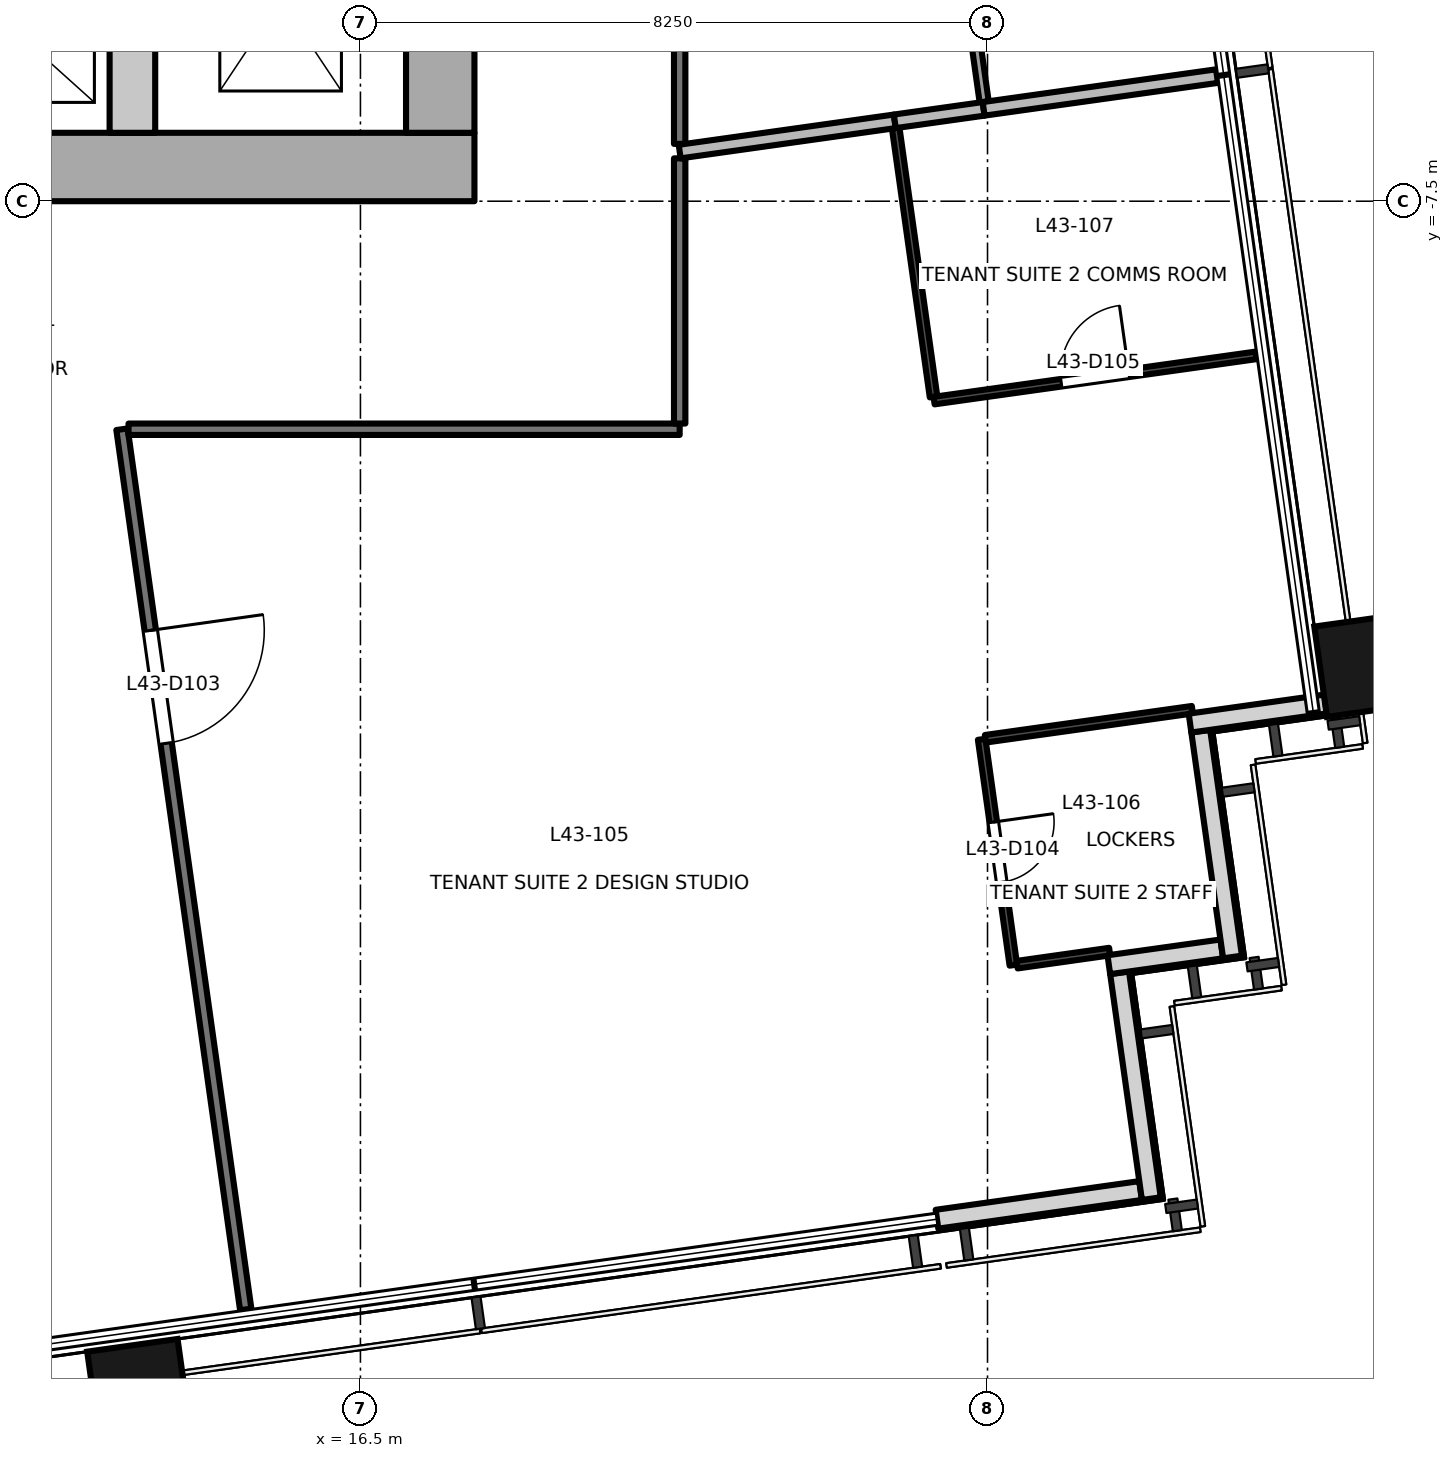
"""IFC4 building model, lengths in metres.
Left out: names, types, materials, properties, quantities, classifications, styles, units other than length and angle.
Written with IfcOpenShell. Run it as: python <this file> out.ifc"""

import sys

from ifc_helpers import new_model, si_unit, direction, frame, frame_2d, origin, origin_2d, place, context, subcontext, project, spatial, rectangle, extrude, element, fill, save


model = new_model("IFC4")
c1 = context("Model", 3, precision=1e-05, world=origin(), true_north=direction((0.0, 1.0)))
c2 = subcontext(c1, "Body", "Model", "MODEL_VIEW")
j1 = project(units=[si_unit("LENGTHUNIT", "METRE"), si_unit("PLANEANGLEUNIT", "RADIAN")], contexts=[c1])
p1 = place(None, origin())
s1 = spatial("IfcSite", under=j1, at=p1, CompositionType="ELEMENT")
p2 = place(p1, origin())
s2 = spatial("IfcBuilding", under=s1, at=p2, CompositionType="ELEMENT")
p3 = place(p2, frame((0.0, 0.0, 188.0)))
s3 = spatial("IfcBuildingStorey", under=s2, at=p3, CompositionType="ELEMENT", Elevation=188.0)
for number, where, z_axis, x_axis in (
    (1, (13.625, -23.443, -0.2), (0.0, 0.0, 1.0), (0.99, 0.139, 0.0)),
    (2, (30.024, -13.565, -0.2), (0.0, 0.0, 1.0), (-0.139, 0.99, 0.0)),
):
    element("IfcColumn", number, at=place(p3, frame(where, z_axis=z_axis, x_axis=x_axis)), inside=s3, PredefinedType="COLUMN", context=c2, shape_type="SweptSolid", body=[
        extrude(rectangle(XDim=1.2, YDim=1.8, at=origin_2d()), origin(), (0.0, 0.0, 1.0), 3.9),
    ])
p4 = place(p3, frame((24.085, -20.893, 0.0), z_axis=(0.0, 0.0, 1.0), x_axis=(0.990255800966, 0.139260362823, 0.0)))
e3 = element("IfcWall", 3, at=p4, inside=s3, PredefinedType="SOLIDWALL", context=c2, shape_type="SweptSolid", body=[
    extrude(rectangle(XDim=2.705, YDim=0.25, at=frame_2d((1.353, 0.0))), origin(), (0.0, 0.0, 1.0), 3.7),
])
p5 = place(p3, frame((26.905, -20.622, 0.0), z_axis=(0.0, 0.0, 1.0), x_axis=(-0.139313431826, 0.990248336385, 0.0)))
e4 = element("IfcWall", 4, at=p5, inside=s3, PredefinedType="SOLIDWALL", context=c2, shape_type="SweptSolid", body=[
    extrude(rectangle(XDim=3.0, YDim=0.25, at=frame_2d((1.5, 0.0))), origin(), (0.0, 0.0, 1.0), 3.7),
])
p6 = place(p3, frame((26.346, -17.544, 0.0), z_axis=(0.0, 0.0, 1.0), x_axis=(0.990368090482, 0.13845954411, 0.0)))
e5 = element("IfcWall", 5, at=p6, inside=s3, PredefinedType="SOLIDWALL", context=c2, shape_type="SweptSolid", body=[
    extrude(rectangle(XDim=1.5, YDim=0.25, at=frame_2d((0.75, 0.0))), origin(), (0.0, 0.0, 1.0), 3.7),
])
p7 = place(p3, frame((27.973, -17.443, 0.0), z_axis=(0.0, 0.0, 1.0), x_axis=(-0.139313431826, 0.990248336385, 0.0)))
e6 = element("IfcWall", 6, at=p7, inside=s3, PredefinedType="SOLIDWALL", context=c2, shape_type="SweptSolid", body=[
    extrude(rectangle(XDim=3.0, YDim=0.25, at=frame_2d((1.5, 0.0))), origin(), (0.0, 0.0, 1.0), 3.7),
])
p8 = place(p3, frame((27.414, -14.366, 0.0), z_axis=(0.0, 0.0, 1.0), x_axis=(0.990256286673, 0.139256908998, 0.0)))
e7 = element("IfcWall", 7, at=p8, inside=s3, PredefinedType="SOLIDWALL", context=c2, shape_type="SweptSolid", body=[
    extrude(rectangle(XDim=1.801, YDim=0.25, at=frame_2d((0.9, 0.0))), origin(), (0.0, 0.0, 1.0), 3.7),
])
p9 = place(p3, frame((-18.0, -7.05, -0.2), z_axis=(0.0, 0.0, 1.0), x_axis=(1.0, 0.0, 0.0)))
e8 = element("IfcWall", 8, at=p9, inside=s3, PredefinedType="SHEAR", context=c2, shape_type="SweptSolid", body=[
    extrude(rectangle(XDim=36.0, YDim=0.9, at=frame_2d((18.0, 0.0))), origin(), (0.0, 0.0, 1.0), 3.9),
])
p10 = place(p9, frame((11.3, 0.0, 0.2)))
e9 = element("IfcOpeningElement", 9, at=p10, cuts=e8, PredefinedType="OPENING", context=c2, shape_type="SweptSolid", body=[
    extrude(rectangle(XDim=1.8, YDim=2.1, at=frame_2d((0.9, 1.05))), frame((0.0, 0.46, 0.0), z_axis=(0.0, -1.0, 0.0), x_axis=(1.0, 0.0, 0.0)), (0.0, 0.0, 1.0), 0.921),
])
p11 = place(p9, frame((16.8, 0.0, 0.2)))
e10 = element("IfcOpeningElement", 10, at=p11, cuts=e8, PredefinedType="OPENING", context=c2, shape_type="SweptSolid", body=[
    extrude(rectangle(XDim=2.4, YDim=2.1, at=frame_2d((1.2, 1.05))), frame((0.0, 0.46, 0.0), z_axis=(0.0, -1.0, 0.0), x_axis=(1.0, 0.0, 0.0)), (0.0, 0.0, 1.0), 0.921),
])
p12 = place(p9, frame((26.1, 0.0, 0.2)))
e11 = element("IfcOpeningElement", 11, at=p12, cuts=e8, PredefinedType="OPENING", context=c2, shape_type="SweptSolid", body=[
    extrude(rectangle(XDim=2.4, YDim=2.1, at=frame_2d((1.2, 1.05))), frame((0.0, 0.46, 0.0), z_axis=(0.0, -1.0, 0.0), x_axis=(1.0, 0.0, 0.0)), (0.0, 0.0, 1.0), 0.921),
])
p13 = place(p3, frame((17.55, -6.6, -0.2), z_axis=(0.0, 0.0, 1.0), x_axis=(0.0, 1.0, 0.0)))
e12 = element("IfcWall", 12, at=p13, inside=s3, PredefinedType="SHEAR", context=c2, shape_type="SweptSolid", body=[
    extrude(rectangle(XDim=13.2, YDim=0.9, at=frame_2d((6.6, 0.0))), origin(), (0.0, 0.0, 1.0), 3.9),
])
p14 = place(p13, frame((4.55, 0.0, 0.2)))
e13 = element("IfcOpeningElement", 13, at=p14, cuts=e12, PredefinedType="OPENING", context=c2, shape_type="SweptSolid", body=[
    extrude(rectangle(XDim=1.2, YDim=2.1, at=frame_2d((0.6, 1.05))), frame((0.0, 0.46, 0.0), z_axis=(0.0, -1.0, 0.0), x_axis=(1.0, 0.0, 0.0)), (0.0, 0.0, 1.0), 0.921),
])
p15 = place(p3, frame((13.5, -6.6, -0.2), z_axis=(0.0, 0.0, 1.0), x_axis=(0.0, 1.0, 0.0)))
e14 = element("IfcWall", 14, at=p15, inside=s3, PredefinedType="SHEAR", context=c2, shape_type="SweptSolid", body=[
    extrude(rectangle(XDim=13.2, YDim=0.6, at=frame_2d((6.6, 0.0))), origin(), (0.0, 0.0, 1.0), 3.9),
])
p16 = place(p3, frame((13.363, -10.5, 0.0), z_axis=(0.0, 0.0, 1.0), x_axis=(0.139211326844, -0.990262695692, 0.0)))
e15 = element("IfcWall", 15, at=p16, inside=s3, PredefinedType="PARTITIONING", context=c2, shape_type="SweptSolid", body=[
    extrude(rectangle(XDim=11.694, YDim=0.15, at=frame_2d((5.847, 0.0))), origin(), (0.0, 0.0, 1.0), 3.1),
])
p17 = place(p16, frame((2.673, 0.0, 0.0)))
e16 = element("IfcOpeningElement", 16, at=p17, cuts=e15, PredefinedType="OPENING", context=c2, shape_type="SweptSolid", body=[
    extrude(rectangle(XDim=1.5, YDim=2.1, at=frame_2d((0.75, 1.05))), frame((0.0, 0.085, 0.0), z_axis=(0.0, -1.0, 0.0), x_axis=(1.0, 0.0, 0.0)), (0.0, 0.0, 1.0), 0.171),
])
p18 = place(p3, frame((20.7, -10.5, 0.0), z_axis=(0.0, 0.0, 1.0), x_axis=(-1.0, 0.0, 0.0)))
e17 = element("IfcWall", 17, at=p18, inside=s3, PredefinedType="PARTITIONING", context=c2, shape_type="SweptSolid", body=[
    extrude(rectangle(XDim=7.251, YDim=0.15, at=frame_2d((3.625, 0.0))), origin(), (0.0, 0.0, 1.0), 3.1),
])
p19 = place(p3, frame((20.7, -6.936, 0.0), z_axis=(0.0, 0.0, 1.0), x_axis=(0.0, -1.0, 0.0)))
e18 = element("IfcWall", 18, at=p19, inside=s3, PredefinedType="PARTITIONING", context=c2, shape_type="SweptSolid", body=[
    extrude(rectangle(XDim=3.489, YDim=0.15, at=frame_2d((1.745, 0.0))), origin(), (0.0, 0.0, 1.0), 3.7),
])
p20 = place(p3, frame((20.7, 4.576, 0.0), z_axis=(0.0, 0.0, 1.0), x_axis=(0.0, -1.0, 0.0)))
e19 = element("IfcWall", 19, at=p20, inside=s3, PredefinedType="PARTITIONING", context=c2, shape_type="SweptSolid", body=[
    extrude(rectangle(XDim=11.322, YDim=0.15, at=frame_2d((5.661, 0.0))), origin(), (0.0, 0.0, 1.0), 3.25),
])
p21 = place(p20, frame((7.691, 0.0, 0.0)))
e20 = element("IfcOpeningElement", 20, at=p21, cuts=e19, PredefinedType="OPENING", context=c2, shape_type="SweptSolid", body=[
    extrude(rectangle(XDim=0.9, YDim=2.1, at=frame_2d((0.45, 1.05))), frame((0.0, 0.085, 0.0), z_axis=(0.0, -1.0, 0.0), x_axis=(1.0, 0.0, 0.0)), (0.0, 0.0, 1.0), 0.171),
])
p22 = place(p3, frame((24.673, -14.579, 0.0), z_axis=(0.0, 0.0, 1.0), x_axis=(0.138994228812, -0.990293191109, 0.0)))
e21 = element("IfcWall", 21, at=p22, inside=s3, PredefinedType="PARTITIONING", context=c2, shape_type="SweptSolid", body=[
    extrude(rectangle(XDim=3.0, YDim=0.1, at=frame_2d((1.5, 0.0))), origin(), (0.0, 0.0, 1.0), 3.7),
])
p23 = place(p22, frame((1.1, 0.0, 0.0)))
e22 = element("IfcOpeningElement", 22, at=p23, cuts=e21, PredefinedType="OPENING", context=c2, shape_type="SweptSolid", body=[
    extrude(rectangle(XDim=0.8, YDim=2.1, at=frame_2d((0.4, 1.05))), frame((0.0, 0.061, 0.0), z_axis=(0.0, -1.0, 0.0), x_axis=(1.0, 0.0, 0.0)), (0.0, 0.0, 1.0), 0.121),
])
p24 = place(p3, frame((25.14, -17.544, 0.0), z_axis=(0.0, 0.0, 1.0), x_axis=(0.990174663817, 0.139836100968, 0.0)))
e23 = element("IfcWall", 23, at=p24, inside=s3, PredefinedType="PARTITIONING", context=c2, shape_type="SweptSolid", body=[
    extrude(rectangle(XDim=1.229, YDim=0.1, at=frame_2d((0.615, 0.0))), origin(), (0.0, 0.0, 1.0), 3.7),
])
p25 = place(p3, frame((27.445, -14.19, 0.0), z_axis=(0.0, 0.0, 1.0), x_axis=(-0.990299764824, -0.138947384969, 0.0)))
e24 = element("IfcWall", 24, at=p25, inside=s3, PredefinedType="PARTITIONING", context=c2, shape_type="SweptSolid", body=[
    extrude(rectangle(XDim=2.75, YDim=0.1, at=frame_2d((1.375, 0.0))), origin(), (0.0, 0.0, 1.0), 3.7),
])
p26 = place(p3, frame((23.542, -6.538, 0.0), z_axis=(0.0, 0.0, 1.0), x_axis=(0.139477964322, -0.990225175134, 0.0)))
e25 = element("IfcWall", 25, at=p26, inside=s3, PredefinedType="PARTITIONING", context=c2, shape_type="SweptSolid", body=[
    extrude(rectangle(XDim=3.571, YDim=0.1, at=frame_2d((1.785, 0.0))), origin(), (0.0, 0.0, 1.0), 3.7),
])
p27 = place(p3, frame((24.047, -10.123, 0.0), z_axis=(0.0, 0.0, 1.0), x_axis=(0.990283364174, 0.139064224876, 0.0)))
e26 = element("IfcWall", 26, at=p27, inside=s3, PredefinedType="PARTITIONING", context=c2, shape_type="SweptSolid", body=[
    extrude(rectangle(XDim=4.278, YDim=0.1, at=frame_2d((2.139, 0.0))), origin(), (0.0, 0.0, 1.0), 3.7),
])
p28 = place(p27, frame((1.689, 0.0, 0.0)))
e27 = element("IfcOpeningElement", 27, at=p28, cuts=e26, PredefinedType="OPENING", context=c2, shape_type="SweptSolid", body=[
    extrude(rectangle(XDim=0.9, YDim=2.1, at=frame_2d((0.45, 1.05))), frame((0.0, 0.061, 0.0), z_axis=(0.0, -1.0, 0.0), x_axis=(1.0, 0.0, 0.0)), (0.0, 0.0, 1.0), 0.121),
])
p29 = place(p3, frame((20.7, -6.847, 0.0), z_axis=(0.0, 0.0, 1.0), x_axis=(0.990258051292, 0.139244360214, 0.0)))
e28 = element("IfcWall", 28, at=p29, inside=s3, PredefinedType="PARTITIONING", context=c2, shape_type="SweptSolid", body=[
    extrude(rectangle(XDim=2.858, YDim=0.18, at=frame_2d((1.429, 0.0))), origin(), (0.0, 0.0, 1.0), 3.7),
])
p30 = place(p3, frame((23.53, -6.449, 0.0), z_axis=(0.0, 0.0, 1.0), x_axis=(0.990293977152, 0.138988628372, 0.0)))
e29 = element("IfcWall", 29, at=p30, inside=s3, PredefinedType="PARTITIONING", context=c2, shape_type="SweptSolid", body=[
    extrude(rectangle(XDim=1.18, YDim=0.18, at=frame_2d((0.59, 0.0))), origin(), (0.0, 0.0, 1.0), 3.7),
])
p31 = place(p3, frame((24.699, -6.285, 0.0), z_axis=(0.0, 0.0, 1.0), x_axis=(0.990293026317, 0.138995402899, 0.0)))
e30 = element("IfcWall", 30, at=p31, inside=s3, PredefinedType="PARTITIONING", context=c2, shape_type="SweptSolid", body=[
    extrude(rectangle(XDim=3.1, YDim=0.18, at=frame_2d((1.55, 0.0))), origin(), (0.0, 0.0, 1.0), 3.7),
])
p32 = place(p3, frame((24.309, -3.371, 0.0), z_axis=(0.0, 0.0, 1.0), x_axis=(0.139298147854, -0.990250486495, 0.0)))
e31 = element("IfcWall", 31, at=p32, inside=s3, PredefinedType="PARTITIONING", context=c2, shape_type="SweptSolid", body=[
    extrude(rectangle(XDim=2.85, YDim=0.12, at=frame_2d((1.425, 0.0))), origin(), (0.0, 0.0, 1.0), 3.25),
])
p33 = place(p17, origin())
e32 = element("IfcDoor", 32, at=p33, inside=s3, OperationType="DOUBLE_DOOR_SINGLE_SWING", PredefinedType="DOOR", context=c2, shape_type="SweptSolid", body=[
    extrude(rectangle(XDim=1.5, YDim=2.1, at=frame_2d((0.75, 1.05))), frame((0.0, 0.025, 0.0), z_axis=(0.0, -1.0, 0.0), x_axis=(1.0, 0.0, 0.0)), (0.0, 0.0, 1.0), 0.05),
])
fill(e16, e32)
p34 = place(p23, origin())
e33 = element("IfcDoor", 33, at=p34, inside=s3, OperationType="SINGLE_SWING_LEFT", PredefinedType="DOOR", context=c2, shape_type="SweptSolid", body=[
    extrude(rectangle(XDim=0.8, YDim=2.1, at=frame_2d((0.4, 1.05))), frame((0.0, 0.025, 0.0), z_axis=(0.0, -1.0, 0.0), x_axis=(1.0, 0.0, 0.0)), (0.0, 0.0, 1.0), 0.05),
])
fill(e22, e33)
p35 = place(p28, origin())
e34 = element("IfcDoor", 34, at=p35, inside=s3, OperationType="SINGLE_SWING_RIGHT", PredefinedType="DOOR", context=c2, shape_type="SweptSolid", body=[
    extrude(rectangle(XDim=0.9, YDim=2.1, at=frame_2d((0.45, 1.05))), frame((0.0, 0.025, 0.0), z_axis=(0.0, -1.0, 0.0), x_axis=(1.0, 0.0, 0.0)), (0.0, 0.0, 1.0), 0.05),
])
fill(e27, e34)
save(model, sys.argv[1])
